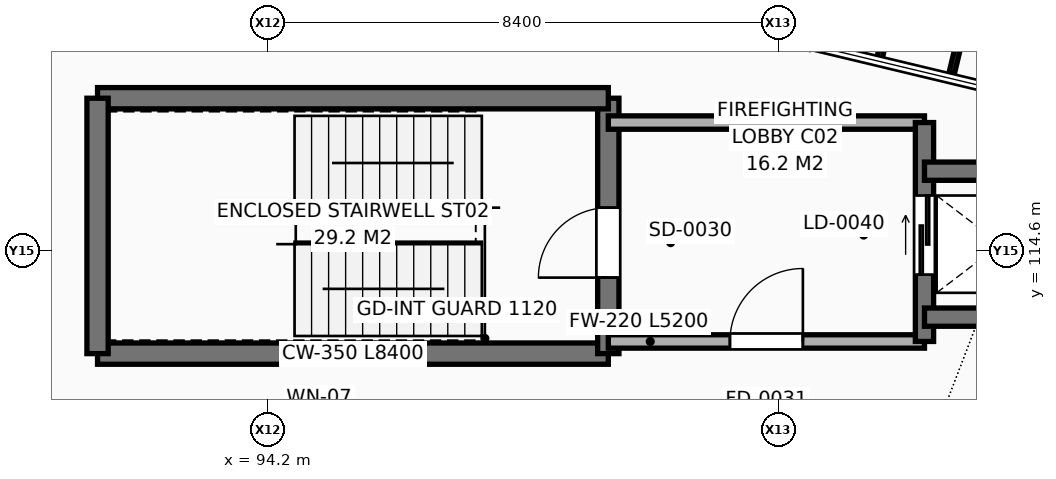
"""IFC4 building model, lengths in metres.
Left out: names, types, materials, properties, quantities, classifications, styles, units other than length and angle.
Written with IfcOpenShell. Run it as: python <this file> out.ifc"""

import sys

from ifc_helpers import new_model, si_unit, direction, frame, frame_2d, origin, place, context, subcontext, project, spatial, rectangle, extrude, element, fill, save


model = new_model("IFC4")
c1 = context("Model", 3, precision=1e-05, world=origin(), true_north=direction((0.0, 1.0)))
c2 = subcontext(c1, "Body", "Model", "MODEL_VIEW")
j1 = project(units=[si_unit("LENGTHUNIT", "METRE"), si_unit("PLANEANGLEUNIT", "RADIAN")], contexts=[c1])
p1 = place(None, origin())
s1 = spatial("IfcSite", under=j1, at=p1, CompositionType="ELEMENT")
p2 = place(p1, origin())
s2 = spatial("IfcBuilding", under=s1, at=p2, CompositionType="ELEMENT")
p3 = place(p2, frame((0.0, 0.0, 18.0)))
s3 = spatial("IfcBuildingStorey", under=s2, at=p3, CompositionType="ELEMENT", Elevation=18.0)
p4 = place(p3, frame((99.0, 111.497, 0.0), z_axis=(0.0, 0.0, 1.0), x_axis=(-0.999197725269, 0.040048792968, 0.0)))
e1 = element("IfcWall", 1, at=p4, inside=s3, PredefinedType="SOLIDWALL", context=c2, shape_type="SweptSolid", body=[
    extrude(rectangle(XDim=13.04, YDim=0.34, at=frame_2d((6.52, 0.0))), origin(), (0.0, 0.0, 1.0), 3.387),
])
p5 = place(p4, frame((2.88, 0.0, 0.9)))
e2 = element("IfcOpeningElement", 2, at=p5, cuts=e1, PredefinedType="OPENING", context=c2, shape_type="SweptSolid", body=[
    extrude(rectangle(XDim=2.2, YDim=2.1, at=frame_2d((1.1, 1.05))), frame((0.0, 0.18, 0.0), z_axis=(0.0, -1.0, 0.0), x_axis=(1.0, 0.0, 0.0)), (0.0, 0.0, 1.0), 0.36),
])
p6 = place(p4, frame((7.96, 0.0, 0.9)))
e3 = element("IfcOpeningElement", 3, at=p6, cuts=e1, PredefinedType="OPENING", context=c2, shape_type="SweptSolid", body=[
    extrude(rectangle(XDim=2.2, YDim=2.1, at=frame_2d((1.1, 1.05))), frame((0.0, 0.18, 0.0), z_axis=(0.0, -1.0, 0.0), x_axis=(1.0, 0.0, 0.0)), (0.0, 0.0, 1.0), 0.36),
])
p7 = place(p3, frame((91.4, 112.9, 0.0), z_axis=(0.0, 0.0, 1.0), x_axis=(1.0, 0.0, 0.0)))
e4 = element("IfcWall", 4, at=p7, inside=s3, PredefinedType="SHEAR", context=c2, shape_type="SweptSolid", body=[
    extrude(rectangle(XDim=8.4, YDim=0.35, at=frame_2d((4.2, 0.0))), origin(), (0.0, 0.0, 1.0), 3.92),
])
p8 = place(p3, frame((99.8, 112.9, 0.0), z_axis=(0.0, 0.0, 1.0), x_axis=(0.0, 1.0, 0.0)))
e5 = element("IfcWall", 5, at=p8, inside=s3, PredefinedType="SHEAR", context=c2, shape_type="SweptSolid", body=[
    extrude(rectangle(XDim=4.2, YDim=0.35, at=frame_2d((2.1, 0.0))), origin(), (0.0, 0.0, 1.0), 3.92),
])
p9 = place(p8, frame((1.25, 0.0, 0.0)))
e6 = element("IfcOpeningElement", 6, at=p9, cuts=e5, PredefinedType="OPENING", context=c2, shape_type="SweptSolid", body=[
    extrude(rectangle(XDim=1.15, YDim=2.2, at=frame_2d((0.575, 1.1))), frame((0.0, 0.185, 0.0), z_axis=(0.0, -1.0, 0.0), x_axis=(1.0, 0.0, 0.0)), (0.0, 0.0, 1.0), 0.37),
])
p10 = place(p3, frame((99.8, 117.1, 0.0), z_axis=(0.0, 0.0, 1.0), x_axis=(-1.0, 0.0, 0.0)))
e7 = element("IfcWall", 7, at=p10, inside=s3, PredefinedType="SHEAR", context=c2, shape_type="SweptSolid", body=[
    extrude(rectangle(XDim=8.4, YDim=0.35, at=frame_2d((4.2, 0.0))), origin(), (0.0, 0.0, 1.0), 3.92),
])
p11 = place(p3, frame((91.4, 117.1, 0.0), z_axis=(0.0, 0.0, 1.0), x_axis=(0.0, -1.0, 0.0)))
e8 = element("IfcWall", 8, at=p11, inside=s3, PredefinedType="SHEAR", context=c2, shape_type="SweptSolid", body=[
    extrude(rectangle(XDim=4.2, YDim=0.35, at=frame_2d((2.1, 0.0))), origin(), (0.0, 0.0, 1.0), 3.92),
])
p12 = place(p3, frame((99.8, 113.1, 0.0), z_axis=(0.0, 0.0, 1.0), x_axis=(1.0, 0.0, 0.0)))
e9 = element("IfcWall", 9, at=p12, inside=s3, PredefinedType="SOLIDWALL", context=c2, shape_type="SweptSolid", body=[
    extrude(rectangle(XDim=5.2, YDim=0.22, at=frame_2d((2.6, 0.0))), origin(), (0.0, 0.0, 1.0), 3.92),
])
p13 = place(p12, frame((2.0, 0.0, 0.0)))
e10 = element("IfcOpeningElement", 10, at=p13, cuts=e9, PredefinedType="OPENING", context=c2, shape_type="SweptSolid", body=[
    extrude(rectangle(XDim=1.2, YDim=2.2, at=frame_2d((0.6, 1.1))), frame((0.0, 0.12, 0.0), z_axis=(0.0, -1.0, 0.0), x_axis=(1.0, 0.0, 0.0)), (0.0, 0.0, 1.0), 0.24),
])
p14 = place(p3, frame((105.0, 116.7, 0.0), z_axis=(0.0, 0.0, 1.0), x_axis=(-1.0, 0.0, 0.0)))
e11 = element("IfcWall", 11, at=p14, inside=s3, PredefinedType="SOLIDWALL", context=c2, shape_type="SweptSolid", body=[
    extrude(rectangle(XDim=5.2, YDim=0.22, at=frame_2d((2.6, 0.0))), origin(), (0.0, 0.0, 1.0), 3.92),
])
p15 = place(p3, frame((105.0, 113.1, 0.0), z_axis=(0.0, 0.0, 1.0), x_axis=(0.0, 1.0, 0.0)))
e12 = element("IfcWall", 12, at=p15, inside=s3, PredefinedType="SHEAR", context=c2, shape_type="SweptSolid", body=[
    extrude(rectangle(XDim=3.6, YDim=0.3, at=frame_2d((1.8, 0.0))), origin(), (0.0, 0.0, 1.0), 3.92),
])
p16 = place(p15, frame((1.1, 0.0, 0.0)))
e13 = element("IfcOpeningElement", 13, at=p16, cuts=e12, PredefinedType="OPENING", context=c2, shape_type="SweptSolid", body=[
    extrude(rectangle(XDim=1.3, YDim=2.3, at=frame_2d((0.65, 1.15))), frame((0.0, 0.16, 0.0), z_axis=(0.0, -1.0, 0.0), x_axis=(1.0, 0.0, 0.0)), (0.0, 0.0, 1.0), 0.32),
])
for number, where, z_axis, x_axis in (
    (14, (107.5, 115.9, 0.0), (0.0, 0.0, 1.0), (-1.0, 0.0, 0.0)),
    (15, (105.0, 113.5, 0.0), (0.0, 0.0, 1.0), (1.0, 0.0, 0.0)),
):
    element("IfcWall", number, at=place(p3, frame(where, z_axis=z_axis, x_axis=x_axis)), inside=s3, PredefinedType="SHEAR", context=c2, shape_type="SweptSolid", body=[
        extrude(rectangle(XDim=2.5, YDim=0.3, at=frame_2d((1.25, 0.0))), origin(), (0.0, 0.0, 1.0), 3.92),
    ])
p17 = place(p9, origin())
e16 = element("IfcDoor", 16, at=p17, inside=s3, OperationType="SINGLE_SWING_LEFT", PredefinedType="DOOR", context=c2, shape_type="SweptSolid", body=[
    extrude(rectangle(XDim=1.15, YDim=2.2, at=frame_2d((0.575, 1.1))), frame((0.0, 0.025, 0.0), z_axis=(0.0, -1.0, 0.0), x_axis=(1.0, 0.0, 0.0)), (0.0, 0.0, 1.0), 0.05),
])
fill(e6, e16)
p18 = place(p13, origin())
e17 = element("IfcDoor", 17, at=p18, inside=s3, OperationType="SINGLE_SWING_RIGHT", PredefinedType="DOOR", context=c2, shape_type="SweptSolid", body=[
    extrude(rectangle(XDim=1.2, YDim=2.2, at=frame_2d((0.6, 1.1))), frame((0.0, 0.025, 0.0), z_axis=(0.0, -1.0, 0.0), x_axis=(1.0, 0.0, 0.0)), (0.0, 0.0, 1.0), 0.05),
])
fill(e10, e17)
p19 = place(p16, origin())
e18 = element("IfcDoor", 18, at=p19, inside=s3, OperationType="SLIDING_TO_LEFT", PredefinedType="DOOR", context=c2, shape_type="SweptSolid", body=[
    extrude(rectangle(XDim=1.3, YDim=2.3, at=frame_2d((0.65, 1.15))), frame((0.0, 0.025, 0.0), z_axis=(0.0, -1.0, 0.0), x_axis=(1.0, 0.0, 0.0)), (0.0, 0.0, 1.0), 0.05),
])
fill(e13, e18)
save(model, sys.argv[1])
